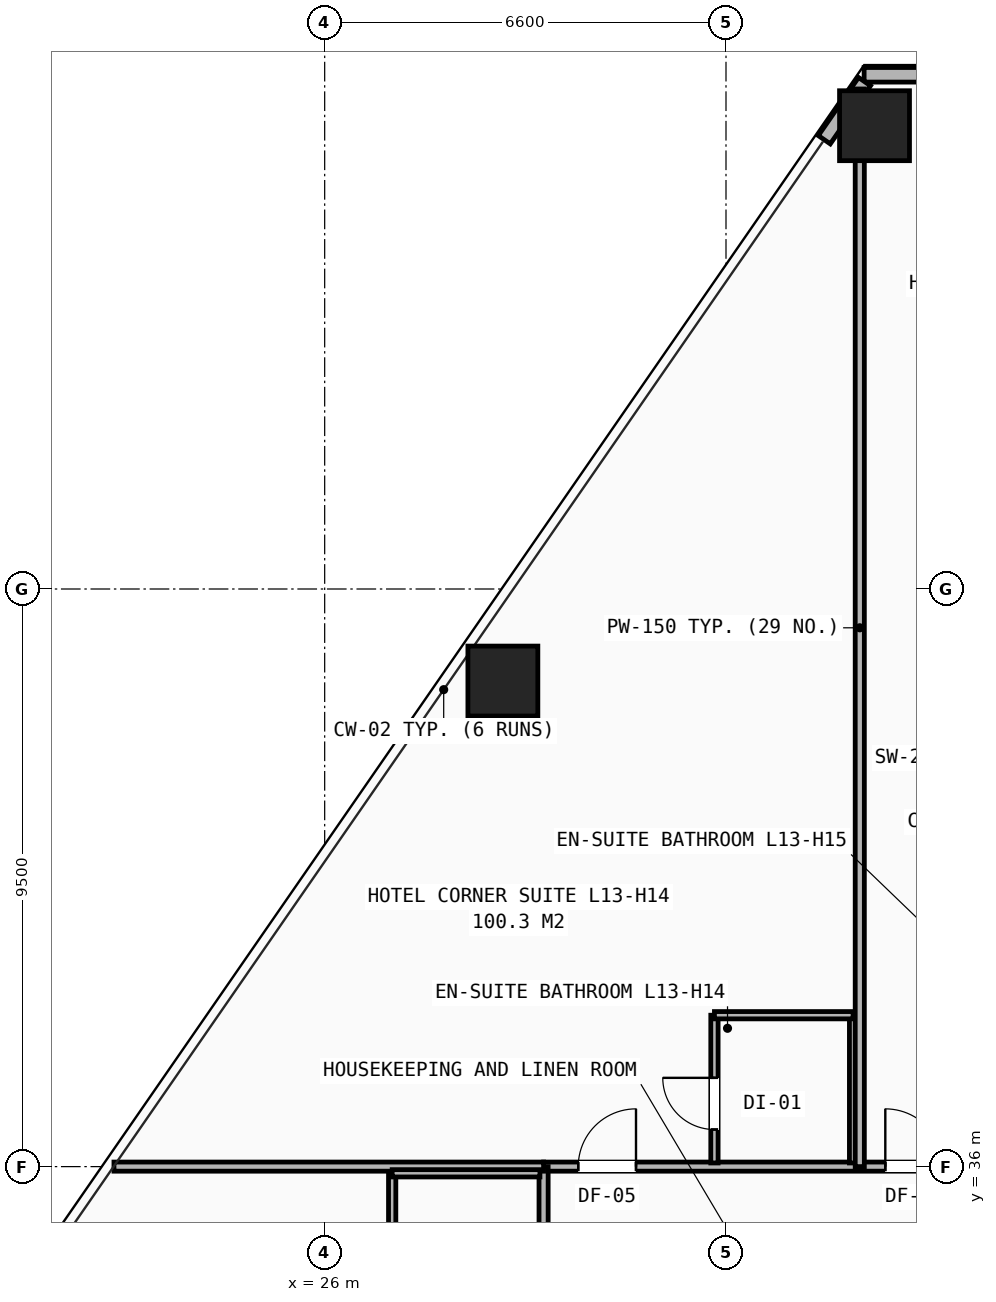
"""IFC4 building model, lengths in metres.
Left out: names, types, materials, properties, quantities, classifications, styles, units other than length and angle.
Written with IfcOpenShell. Run it as: python <this file> out.ifc"""

import sys

from ifc_helpers import new_model, si_unit, direction, frame, frame_2d, origin, origin_2d, place, context, subcontext, project, spatial, rectangle, hollow_rectangle, extrude, element, fill, save


model = new_model("IFC4")
c1 = context("Model", 3, precision=1e-05, world=origin(), true_north=direction((0.0, 1.0)))
c2 = subcontext(c1, "Body", "Model", "MODEL_VIEW")
j1 = project(units=[si_unit("LENGTHUNIT", "METRE"), si_unit("PLANEANGLEUNIT", "RADIAN")], contexts=[c1])
p1 = place(None, origin())
s1 = spatial("IfcSite", under=j1, at=p1, CompositionType="ELEMENT")
p2 = place(p1, origin())
s2 = spatial("IfcBuilding", under=s1, at=p2, CompositionType="ELEMENT")
p3 = place(p2, frame((0.0, 0.0, 49.6)))
s3 = spatial("IfcBuildingStorey", under=s2, at=p3, CompositionType="ELEMENT", Elevation=49.6)
for number, where, z_axis, x_axis in (
    (1, (35.042, 53.12, 0.0), (0.0, 0.0, 1.0), (1.0, 0.0, 0.0)),
    (2, (28.931, 43.986, 0.0), (0.0, 0.0, 1.0), (1.0, 0.0, 0.0)),
):
    element("IfcColumn", number, at=place(p3, frame(where, z_axis=z_axis, x_axis=x_axis)), inside=s3, PredefinedType="COLUMN", context=c2, shape_type="SweptSolid", body=[
        extrude(hollow_rectangle(XDim=1.15, YDim=1.15, WallThickness=0.075, at=origin_2d()), origin(), (0.0, 0.0, 1.0), 3.2),
    ])
p4 = place(p3, frame((34.872, 53.957, 0.0), z_axis=(0.0, 0.0, 1.0), x_axis=(1.0, 0.0, 0.0)))
e3 = element("IfcWall", 3, at=p4, inside=s3, PredefinedType="SHEAR", context=c2, shape_type="SweptSolid", body=[
    extrude(rectangle(XDim=10.257, YDim=0.24, at=frame_2d((5.128, 0.0))), origin(), (0.0, 0.0, 1.0), 2.263),
])
p5 = place(p3, frame((34.878, 53.845, 0.0), z_axis=(0.0, 0.0, 1.0), x_axis=(-0.569057100516, -0.822298009454, 0.0)))
e4 = element("IfcWall", 4, at=p5, inside=s3, PredefinedType="SHEAR", context=c2, shape_type="SweptSolid", body=[
    extrude(rectangle(XDim=1.163, YDim=0.24, at=frame_2d((0.581, 0.0))), origin(), (0.0, 0.0, 1.0), 2.263),
])
p6 = place(p3, frame((29.6, 36.0, 0.0), z_axis=(0.0, 0.0, 1.0), x_axis=(1.0, 0.0, 0.0)))
e5 = element("IfcWall", 5, at=p6, inside=s3, PredefinedType="PARTITIONING", context=c2, shape_type="SweptSolid", body=[
    extrude(rectangle(XDim=10.175, YDim=0.15, at=frame_2d((5.087, 0.0))), origin(), (0.0, 0.0, 1.0), 2.98),
])
p7 = place(p6, frame((0.57, 0.0, 0.0)))
e6 = element("IfcOpeningElement", 6, at=p7, cuts=e5, PredefinedType="OPENING", context=c2, shape_type="SweptSolid", body=[
    extrude(rectangle(XDim=0.95, YDim=2.1, at=frame_2d((0.475, 1.05))), frame((0.0, 0.085, 0.0), z_axis=(0.0, -1.0, 0.0), x_axis=(1.0, 0.0, 0.0)), (0.0, 0.0, 1.0), 0.17),
])
p8 = place(p6, frame((5.62, 0.0, 0.0)))
e7 = element("IfcOpeningElement", 7, at=p8, cuts=e5, PredefinedType="OPENING", context=c2, shape_type="SweptSolid", body=[
    extrude(rectangle(XDim=0.95, YDim=2.1, at=frame_2d((0.475, 1.05))), frame((0.0, 0.085, 0.0), z_axis=(0.0, -1.0, 0.0), x_axis=(1.0, 0.0, 0.0)), (0.0, 0.0, 1.0), 0.17),
])
p9 = place(p3, frame((29.6, 14.1, 0.0), z_axis=(0.0, 0.0, 1.0), x_axis=(0.0, 1.0, 0.0)))
e8 = element("IfcWall", 8, at=p9, inside=s3, PredefinedType="PARTITIONING", context=c2, shape_type="SweptSolid", body=[
    extrude(rectangle(XDim=21.9, YDim=0.15, at=frame_2d((10.95, 0.0))), origin(), (0.0, 0.0, 1.0), 2.431),
])
p10 = place(p9, frame((0.42, 0.0, 0.0)))
e9 = element("IfcOpeningElement", 9, at=p10, cuts=e8, PredefinedType="OPENING", context=c2, shape_type="SweptSolid", body=[
    extrude(rectangle(XDim=0.95, YDim=2.1, at=frame_2d((0.475, 1.05))), frame((0.0, 0.085, 0.0), z_axis=(0.0, -1.0, 0.0), x_axis=(1.0, 0.0, 0.0)), (0.0, 0.0, 1.0), 0.17),
])
p11 = place(p9, frame((5.12, 0.0, 0.0)))
e10 = element("IfcOpeningElement", 10, at=p11, cuts=e8, PredefinedType="OPENING", context=c2, shape_type="SweptSolid", body=[
    extrude(rectangle(XDim=0.95, YDim=2.1, at=frame_2d((0.475, 1.05))), frame((0.0, 0.085, 0.0), z_axis=(0.0, -1.0, 0.0), x_axis=(1.0, 0.0, 0.0)), (0.0, 0.0, 1.0), 0.17),
])
p12 = place(p9, frame((10.12, 0.0, 0.0)))
e11 = element("IfcOpeningElement", 11, at=p12, cuts=e8, PredefinedType="OPENING", context=c2, shape_type="SweptSolid", body=[
    extrude(rectangle(XDim=0.95, YDim=2.1, at=frame_2d((0.475, 1.05))), frame((0.0, 0.085, 0.0), z_axis=(0.0, -1.0, 0.0), x_axis=(1.0, 0.0, 0.0)), (0.0, 0.0, 1.0), 0.17),
])
p13 = place(p9, frame((16.12, 0.0, 0.0)))
e12 = element("IfcOpeningElement", 12, at=p13, cuts=e8, PredefinedType="OPENING", context=c2, shape_type="SweptSolid", body=[
    extrude(rectangle(XDim=0.95, YDim=2.1, at=frame_2d((0.475, 1.05))), frame((0.0, 0.085, 0.0), z_axis=(0.0, -1.0, 0.0), x_axis=(1.0, 0.0, 0.0)), (0.0, 0.0, 1.0), 0.17),
])
p14 = place(p3, frame((22.535, 36.0, 0.0), z_axis=(0.0, 0.0, 1.0), x_axis=(1.0, 0.0, 0.0)))
e13 = element("IfcWall", 13, at=p14, inside=s3, PredefinedType="PARTITIONING", context=c2, shape_type="SweptSolid", body=[
    extrude(rectangle(XDim=7.065, YDim=0.15, at=frame_2d((3.533, 0.0))), origin(), (0.0, 0.0, 1.0), 2.268),
])
p15 = place(p3, frame((27.11, 33.61, 0.0), z_axis=(0.0, 0.0, 1.0), x_axis=(0.0, 1.0, 0.0)))
e14 = element("IfcWall", 14, at=p15, inside=s3, PredefinedType="PARTITIONING", context=c2, shape_type="SweptSolid", body=[
    extrude(rectangle(XDim=2.28, YDim=0.12, at=frame_2d((1.14, 0.0))), origin(), (0.0, 0.0, 1.0), 2.513),
])
p16 = place(p3, frame((27.11, 35.89, 0.0), z_axis=(0.0, 0.0, 1.0), x_axis=(1.0, 0.0, 0.0)))
e15 = element("IfcWall", 15, at=p16, inside=s3, PredefinedType="PARTITIONING", context=c2, shape_type="SweptSolid", body=[
    extrude(rectangle(XDim=2.43, YDim=0.12, at=frame_2d((1.215, 0.0))), origin(), (0.0, 0.0, 1.0), 2.513),
])
p17 = place(p3, frame((32.41, 36.06, 0.0), z_axis=(0.0, 0.0, 1.0), x_axis=(0.0, 1.0, 0.0)))
e16 = element("IfcWall", 16, at=p17, inside=s3, PredefinedType="PARTITIONING", context=c2, shape_type="SweptSolid", body=[
    extrude(rectangle(XDim=2.43, YDim=0.12, at=frame_2d((1.215, 0.0))), origin(), (0.0, 0.0, 1.0), 2.98),
])
p18 = place(p17, frame((0.55, 0.0, 0.0)))
e17 = element("IfcOpeningElement", 17, at=p18, cuts=e16, PredefinedType="OPENING", context=c2, shape_type="SweptSolid", body=[
    extrude(rectangle(XDim=0.85, YDim=2.05, at=frame_2d((0.425, 1.025))), frame((0.0, 0.07, 0.0), z_axis=(0.0, -1.0, 0.0), x_axis=(1.0, 0.0, 0.0)), (0.0, 0.0, 1.0), 0.14),
])
p19 = place(p3, frame((34.69, 36.06, 0.0), z_axis=(0.0, 0.0, 1.0), x_axis=(0.0, 1.0, 0.0)))
e18 = element("IfcWall", 18, at=p19, inside=s3, PredefinedType="PARTITIONING", context=c2, shape_type="SweptSolid", body=[
    extrude(rectangle(XDim=2.43, YDim=0.12, at=frame_2d((1.215, 0.0))), origin(), (0.0, 0.0, 1.0), 2.98),
])
p20 = place(p3, frame((32.41, 38.49, 0.0), z_axis=(0.0, 0.0, 1.0), x_axis=(1.0, 0.0, 0.0)))
e19 = element("IfcWall", 19, at=p20, inside=s3, PredefinedType="PARTITIONING", context=c2, shape_type="SweptSolid", body=[
    extrude(rectangle(XDim=2.28, YDim=0.12, at=frame_2d((1.14, 0.0))), origin(), (0.0, 0.0, 1.0), 2.98),
])
p21 = place(p3, frame((34.8, 36.0, 0.0), z_axis=(0.0, 0.0, 1.0), x_axis=(0.0, 1.0, 0.0)))
e20 = element("IfcWall", 20, at=p21, inside=s3, PredefinedType="PARTITIONING", context=c2, shape_type="SweptSolid", body=[
    extrude(rectangle(XDim=17.724, YDim=0.15, at=frame_2d((8.862, 0.0))), origin(), (0.0, 0.0, 1.0), 2.268),
])
p22 = place(p7, origin())
e21 = element("IfcDoor", 21, at=p22, inside=s3, OperationType="SINGLE_SWING_RIGHT", PredefinedType="DOOR", context=c2, shape_type="SweptSolid", body=[
    extrude(rectangle(XDim=0.95, YDim=2.1, at=frame_2d((0.475, 1.05))), frame((0.0, 0.025, 0.0), z_axis=(0.0, -1.0, 0.0), x_axis=(1.0, 0.0, 0.0)), (0.0, 0.0, 1.0), 0.05),
])
fill(e6, e21)
p23 = place(p18, origin())
e22 = element("IfcDoor", 22, at=p23, inside=s3, OperationType="SINGLE_SWING_RIGHT", PredefinedType="DOOR", context=c2, shape_type="SweptSolid", body=[
    extrude(rectangle(XDim=0.85, YDim=2.05, at=frame_2d((0.425, 1.025))), frame((0.0, 0.025, 0.0), z_axis=(0.0, -1.0, 0.0), x_axis=(1.0, 0.0, 0.0)), (0.0, 0.0, 1.0), 0.05),
])
fill(e17, e22)
p24 = place(p8, origin())
e23 = element("IfcDoor", 23, at=p24, inside=s3, OperationType="SINGLE_SWING_LEFT", PredefinedType="DOOR", context=c2, shape_type="SweptSolid", body=[
    extrude(rectangle(XDim=0.95, YDim=2.1, at=frame_2d((0.475, 1.05))), frame((0.0, 0.025, 0.0), z_axis=(0.0, -1.0, 0.0), x_axis=(1.0, 0.0, 0.0)), (0.0, 0.0, 1.0), 0.05),
])
fill(e7, e23)
save(model, sys.argv[1])
